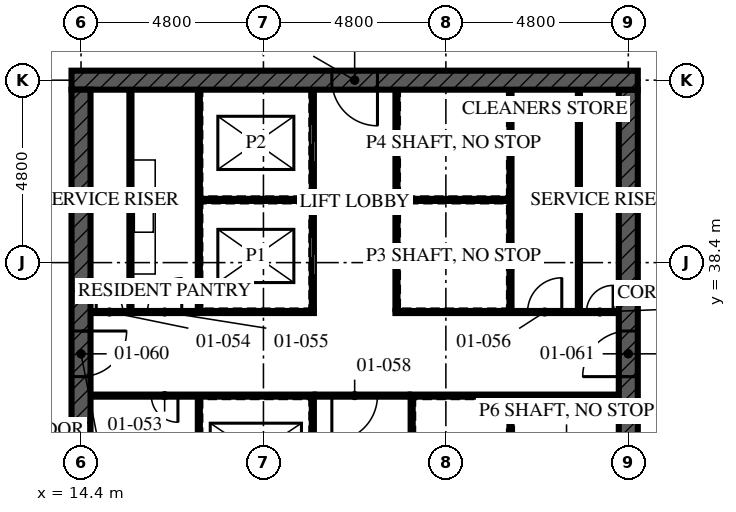
"""IFC4 building model, lengths in metres.
Left out: names, types, materials, properties, quantities, classifications, styles, units other than length and angle.
Written with IfcOpenShell. Run it as: python <this file> out.ifc"""

import sys

from ifc_helpers import new_model, si_unit, direction, frame, frame_2d, origin, place, context, subcontext, project, spatial, rectangle, extrude, element, fill, save


model = new_model("IFC4")
c1 = context("Model", 3, precision=1e-05, world=origin(), true_north=direction((0.0, 1.0)))
c2 = subcontext(c1, "Body", "Model", "MODEL_VIEW")
j1 = project(units=[si_unit("LENGTHUNIT", "METRE"), si_unit("PLANEANGLEUNIT", "RADIAN")], contexts=[c1])
p1 = place(None, origin())
s1 = spatial("IfcSite", under=j1, at=p1, CompositionType="ELEMENT")
p2 = place(p1, origin())
s2 = spatial("IfcBuilding", under=s1, at=p2, CompositionType="ELEMENT")
p3 = place(p2, frame((0.0, 0.0, 4.5)))
s3 = spatial("IfcBuildingStorey", under=s2, at=p3, CompositionType="ELEMENT", Elevation=4.5)
p4 = place(p3, frame((29.05, 43.2, -0.17), z_axis=(0.0, 0.0, 1.0), x_axis=(-1.0, 0.0, 0.0)))
e1 = element("IfcWall", 1, at=p4, inside=s3, PredefinedType="SHEAR", context=c2, shape_type="SweptSolid", body=[
    extrude(rectangle(XDim=14.9, YDim=0.5, at=frame_2d((7.45, 0.0))), origin(), (0.0, 0.0, 1.0), 4.5),
])
p5 = place(p4, frame((6.85, 0.0, 0.17)))
e2 = element("IfcOpeningElement", 2, at=p5, cuts=e1, PredefinedType="OPENING", context=c2, shape_type="SweptSolid", body=[
    extrude(rectangle(XDim=1.2, YDim=2.1, at=frame_2d((0.6, 1.05))), frame((0.0, 0.26, 0.0), z_axis=(0.0, -1.0, 0.0), x_axis=(1.0, 0.0, 0.0)), (0.0, 0.0, 1.0), 0.521),
])
p6 = place(p3, frame((14.4, 42.95, -0.17), z_axis=(0.0, 0.0, 1.0), x_axis=(0.0, -1.0, 0.0)))
e3 = element("IfcWall", 3, at=p6, inside=s3, PredefinedType="SHEAR", context=c2, shape_type="SweptSolid", body=[
    extrude(rectangle(XDim=13.9, YDim=0.5, at=frame_2d((6.95, 0.0))), origin(), (0.0, 0.0, 1.0), 4.5),
])
p7 = place(p6, frame((6.35, 0.0, 0.17)))
e4 = element("IfcOpeningElement", 4, at=p7, cuts=e3, PredefinedType="OPENING", context=c2, shape_type="SweptSolid", body=[
    extrude(rectangle(XDim=1.2, YDim=2.1, at=frame_2d((0.6, 1.05))), frame((0.0, 0.26, 0.0), z_axis=(0.0, -1.0, 0.0), x_axis=(1.0, 0.0, 0.0)), (0.0, 0.0, 1.0), 0.521),
])
p8 = place(p3, frame((28.8, 29.05, -0.17), z_axis=(0.0, 0.0, 1.0), x_axis=(0.0, 1.0, 0.0)))
e5 = element("IfcWall", 5, at=p8, inside=s3, PredefinedType="SHEAR", context=c2, shape_type="SweptSolid", body=[
    extrude(rectangle(XDim=13.9, YDim=0.5, at=frame_2d((6.95, 0.0))), origin(), (0.0, 0.0, 1.0), 4.5),
])
p9 = place(p8, frame((6.35, 0.0, 0.17)))
e6 = element("IfcOpeningElement", 6, at=p9, cuts=e5, PredefinedType="OPENING", context=c2, shape_type="SweptSolid", body=[
    extrude(rectangle(XDim=1.2, YDim=2.1, at=frame_2d((0.6, 1.05))), frame((0.0, 0.26, 0.0), z_axis=(0.0, -1.0, 0.0), x_axis=(1.0, 0.0, 0.0)), (0.0, 0.0, 1.0), 0.521),
])
for number, where, z_axis, x_axis in (
    (7, (15.7, 37.15, 0.0), (0.0, 0.0, 1.0), (0.0, 1.0, 0.0)),
    (8, (27.5, 37.15, 0.0), (0.0, 0.0, 1.0), (0.0, 1.0, 0.0)),
):
    element("IfcWall", number, at=place(p3, frame(where, z_axis=z_axis, x_axis=x_axis)), inside=s3, PredefinedType="SOLIDWALL", context=c2, shape_type="SweptSolid", body=[
        extrude(rectangle(XDim=5.8, YDim=0.1, at=frame_2d((2.9, 0.0))), origin(), (0.0, 0.0, 1.0), 4.33),
    ])
p10 = place(p3, frame((20.5, 29.05, 0.0), z_axis=(0.0, 0.0, 1.0), x_axis=(0.0, 1.0, 0.0)))
e9 = element("IfcWall", 9, at=p10, inside=s3, PredefinedType="SOLIDWALL", context=c2, shape_type="SweptSolid", body=[
    extrude(rectangle(XDim=5.8, YDim=0.1, at=frame_2d((2.9, 0.0))), origin(), (0.0, 0.0, 1.0), 4.33),
])
p11 = place(p10, frame((0.8, 0.0, 0.0)))
e10 = element("IfcOpeningElement", 10, at=p11, cuts=e9, PredefinedType="OPENING", context=c2, shape_type="SweptSolid", body=[
    extrude(rectangle(XDim=1.1, YDim=2.3, at=frame_2d((0.55, 1.15))), frame((0.0, 0.061, 0.0), z_axis=(0.0, -1.0, 0.0), x_axis=(1.0, 0.0, 0.0)), (0.0, 0.0, 1.0), 0.121),
])
p12 = place(p10, frame((3.775, 0.0, 0.0)))
e11 = element("IfcOpeningElement", 11, at=p12, cuts=e9, PredefinedType="OPENING", context=c2, shape_type="SweptSolid", body=[
    extrude(rectangle(XDim=1.1, YDim=2.3, at=frame_2d((0.55, 1.15))), frame((0.0, 0.061, 0.0), z_axis=(0.0, -1.0, 0.0), x_axis=(1.0, 0.0, 0.0)), (0.0, 0.0, 1.0), 0.121),
])
p13 = place(p3, frame((20.5, 37.15, 0.0), z_axis=(0.0, 0.0, 1.0), x_axis=(0.0, 1.0, 0.0)))
e12 = element("IfcWall", 12, at=p13, inside=s3, PredefinedType="SOLIDWALL", context=c2, shape_type="SweptSolid", body=[
    extrude(rectangle(XDim=5.8, YDim=0.1, at=frame_2d((2.9, 0.0))), origin(), (0.0, 0.0, 1.0), 4.33),
])
p14 = place(p13, frame((0.925, 0.0, 0.0)))
e13 = element("IfcOpeningElement", 13, at=p14, cuts=e12, PredefinedType="OPENING", context=c2, shape_type="SweptSolid", body=[
    extrude(rectangle(XDim=1.0, YDim=2.1, at=frame_2d((0.5, 1.05))), frame((0.0, 0.061, 0.0), z_axis=(0.0, -1.0, 0.0), x_axis=(1.0, 0.0, 0.0)), (0.0, 0.0, 1.0), 0.121),
])
p15 = place(p13, frame((3.9, 0.0, 0.0)))
e14 = element("IfcOpeningElement", 14, at=p15, cuts=e12, PredefinedType="OPENING", context=c2, shape_type="SweptSolid", body=[
    extrude(rectangle(XDim=1.0, YDim=2.1, at=frame_2d((0.5, 1.05))), frame((0.0, 0.061, 0.0), z_axis=(0.0, -1.0, 0.0), x_axis=(1.0, 0.0, 0.0)), (0.0, 0.0, 1.0), 0.121),
])
p16 = place(p3, frame((22.7, 37.15, 0.0), z_axis=(0.0, 0.0, 1.0), x_axis=(0.0, 1.0, 0.0)))
e15 = element("IfcWall", 15, at=p16, inside=s3, PredefinedType="SOLIDWALL", context=c2, shape_type="SweptSolid", body=[
    extrude(rectangle(XDim=5.8, YDim=0.1, at=frame_2d((2.9, 0.0))), origin(), (0.0, 0.0, 1.0), 4.33),
])
p17 = place(p3, frame((23.1, 29.05, 0.0), z_axis=(0.0, 0.0, 1.0), x_axis=(0.0, 1.0, 0.0)))
e16 = element("IfcWall", 16, at=p17, inside=s3, PredefinedType="SOLIDWALL", context=c2, shape_type="SweptSolid", body=[
    extrude(rectangle(XDim=5.8, YDim=0.1, at=frame_2d((2.9, 0.0))), origin(), (0.0, 0.0, 1.0), 4.33),
])
p18 = place(p17, frame((1.0, 0.0, 0.0)))
e17 = element("IfcOpeningElement", 17, at=p18, cuts=e16, PredefinedType="OPENING", context=c2, shape_type="SweptSolid", body=[
    extrude(rectangle(XDim=0.7, YDim=2.1, at=frame_2d((0.35, 1.05))), frame((0.0, 0.061, 0.0), z_axis=(0.0, -1.0, 0.0), x_axis=(1.0, 0.0, 0.0)), (0.0, 0.0, 1.0), 0.121),
])
p19 = place(p3, frame((14.65, 34.9, 0.0), z_axis=(0.0, 0.0, 1.0), x_axis=(1.0, 0.0, 0.0)))
e18 = element("IfcWall", 18, at=p19, inside=s3, PredefinedType="SOLIDWALL", context=c2, shape_type="SweptSolid", body=[
    extrude(rectangle(XDim=5.9, YDim=0.1, at=frame_2d((2.95, 0.0))), origin(), (0.0, 0.0, 1.0), 4.33),
])
p20 = place(p19, frame((1.6, 0.0, 0.0)))
e19 = element("IfcOpeningElement", 19, at=p20, cuts=e18, PredefinedType="OPENING", context=c2, shape_type="SweptSolid", body=[
    extrude(rectangle(XDim=0.7, YDim=2.1, at=frame_2d((0.35, 1.05))), frame((0.0, 0.061, 0.0), z_axis=(0.0, -1.0, 0.0), x_axis=(1.0, 0.0, 0.0)), (0.0, 0.0, 1.0), 0.121),
])
p21 = place(p3, frame((23.05, 34.9, 0.0), z_axis=(0.0, 0.0, 1.0), x_axis=(1.0, 0.0, 0.0)))
e20 = element("IfcWall", 20, at=p21, inside=s3, PredefinedType="SOLIDWALL", context=c2, shape_type="SweptSolid", body=[
    extrude(rectangle(XDim=5.5, YDim=0.1, at=frame_2d((2.75, 0.0))), origin(), (0.0, 0.0, 1.0), 4.33),
])
p22 = place(p3, frame((14.65, 37.1, 0.0), z_axis=(0.0, 0.0, 1.0), x_axis=(1.0, 0.0, 0.0)))
e21 = element("IfcWall", 21, at=p22, inside=s3, PredefinedType="SOLIDWALL", context=c2, shape_type="SweptSolid", body=[
    extrude(rectangle(XDim=5.9, YDim=0.1, at=frame_2d((2.95, 0.0))), origin(), (0.0, 0.0, 1.0), 4.33),
])
p23 = place(p22, frame((0.15, 0.0, 0.0)))
e22 = element("IfcOpeningElement", 22, at=p23, cuts=e21, PredefinedType="OPENING", context=c2, shape_type="SweptSolid", body=[
    extrude(rectangle(XDim=0.7, YDim=2.1, at=frame_2d((0.35, 1.05))), frame((0.0, 0.061, 0.0), z_axis=(0.0, -1.0, 0.0), x_axis=(1.0, 0.0, 0.0)), (0.0, 0.0, 1.0), 0.121),
])
p24 = place(p22, frame((1.5, 0.0, 0.0)))
e23 = element("IfcOpeningElement", 23, at=p24, cuts=e21, PredefinedType="OPENING", context=c2, shape_type="SweptSolid", body=[
    extrude(rectangle(XDim=0.9, YDim=2.1, at=frame_2d((0.45, 1.05))), frame((0.0, 0.061, 0.0), z_axis=(0.0, -1.0, 0.0), x_axis=(1.0, 0.0, 0.0)), (0.0, 0.0, 1.0), 0.121),
])
p25 = place(p3, frame((22.65, 37.1, 0.0), z_axis=(0.0, 0.0, 1.0), x_axis=(1.0, 0.0, 0.0)))
e24 = element("IfcWall", 24, at=p25, inside=s3, PredefinedType="SOLIDWALL", context=c2, shape_type="SweptSolid", body=[
    extrude(rectangle(XDim=5.9, YDim=0.1, at=frame_2d((2.95, 0.0))), origin(), (0.0, 0.0, 1.0), 4.33),
])
p26 = place(p25, frame((3.5, 0.0, 0.0)))
e25 = element("IfcOpeningElement", 25, at=p26, cuts=e24, PredefinedType="OPENING", context=c2, shape_type="SweptSolid", body=[
    extrude(rectangle(XDim=0.9, YDim=2.1, at=frame_2d((0.45, 1.05))), frame((0.0, 0.061, 0.0), z_axis=(0.0, -1.0, 0.0), x_axis=(1.0, 0.0, 0.0)), (0.0, 0.0, 1.0), 0.121),
])
p27 = place(p25, frame((5.05, 0.0, 0.0)))
e26 = element("IfcOpeningElement", 26, at=p27, cuts=e24, PredefinedType="OPENING", context=c2, shape_type="SweptSolid", body=[
    extrude(rectangle(XDim=0.7, YDim=2.1, at=frame_2d((0.35, 1.05))), frame((0.0, 0.061, 0.0), z_axis=(0.0, -1.0, 0.0), x_axis=(1.0, 0.0, 0.0)), (0.0, 0.0, 1.0), 0.121),
])
p28 = place(p3, frame((20.55, 34.9, 0.0), z_axis=(0.0, 0.0, 1.0), x_axis=(1.0, 0.0, 0.0)))
e27 = element("IfcWall", 27, at=p28, inside=s3, PredefinedType="SOLIDWALL", context=c2, shape_type="SweptSolid", body=[
    extrude(rectangle(XDim=2.5, YDim=0.1, at=frame_2d((1.25, 0.0))), origin(), (0.0, 0.0, 1.0), 4.33),
])
p29 = place(p28, frame((0.45, 0.0, 0.0)))
e28 = element("IfcOpeningElement", 28, at=p29, cuts=e27, PredefinedType="OPENING", context=c2, shape_type="SweptSolid", body=[
    extrude(rectangle(XDim=1.2, YDim=2.1, at=frame_2d((0.6, 1.05))), frame((0.0, 0.061, 0.0), z_axis=(0.0, -1.0, 0.0), x_axis=(1.0, 0.0, 0.0)), (0.0, 0.0, 1.0), 0.121),
])
for number, where, z_axis, x_axis in (
    (29, (17.5, 29.05, 0.0), (0.0, 0.0, 1.0), (0.0, 1.0, 0.0)),
    (30, (17.5, 37.15, 0.0), (0.0, 0.0, 1.0), (0.0, 1.0, 0.0)),
):
    element("IfcWall", number, at=place(p3, frame(where, z_axis=z_axis, x_axis=x_axis)), inside=s3, PredefinedType="SOLIDWALL", context=c2, shape_type="SweptSolid", body=[
        extrude(rectangle(XDim=5.8, YDim=0.1, at=frame_2d((2.9, 0.0))), origin(), (0.0, 0.0, 1.0), 4.33),
    ])
for number, where, z_axis, x_axis in (
    (31, (17.55, 40.05, 0.0), (0.0, 0.0, 1.0), (1.0, 0.0, 0.0)),
    (32, (22.75, 40.05, 0.0), (0.0, 0.0, 1.0), (1.0, 0.0, 0.0)),
):
    element("IfcWall", number, at=place(p3, frame(where, z_axis=z_axis, x_axis=x_axis)), inside=s3, PredefinedType="SOLIDWALL", context=c2, shape_type="SweptSolid", body=[
        extrude(rectangle(XDim=2.9, YDim=0.1, at=frame_2d((1.45, 0.0))), origin(), (0.0, 0.0, 1.0), 4.33),
    ])
p30 = place(p3, frame((25.7, 37.15, 0.0), z_axis=(0.0, 0.0, 1.0), x_axis=(0.0, 1.0, 0.0)))
e33 = element("IfcWall", 33, at=p30, inside=s3, PredefinedType="SOLIDWALL", context=c2, shape_type="SweptSolid", body=[
    extrude(rectangle(XDim=5.8, YDim=0.1, at=frame_2d((2.9, 0.0))), origin(), (0.0, 0.0, 1.0), 4.33),
])
p31 = place(p3, frame((25.7, 31.95, 0.0), z_axis=(0.0, 0.0, 1.0), x_axis=(0.0, 1.0, 0.0)))
e34 = element("IfcWall", 34, at=p31, inside=s3, PredefinedType="SOLIDWALL", context=c2, shape_type="SweptSolid", body=[
    extrude(rectangle(XDim=2.9, YDim=0.1, at=frame_2d((1.45, 0.0))), origin(), (0.0, 0.0, 1.0), 4.33),
])
p32 = place(p14, origin())
e35 = element("IfcDoor", 35, at=p32, inside=s3, OperationType="SLIDING_TO_LEFT", PredefinedType="DOOR", context=c2, shape_type="SweptSolid", body=[
    extrude(rectangle(XDim=1.0, YDim=2.1, at=frame_2d((0.5, 1.05))), frame((0.0, 0.05, 0.0), z_axis=(0.0, -1.0, 0.0), x_axis=(1.0, 0.0, 0.0)), (0.0, 0.0, 1.0), 0.1),
])
fill(e13, e35)
p33 = place(p15, origin())
e36 = element("IfcDoor", 36, at=p33, inside=s3, OperationType="SLIDING_TO_LEFT", PredefinedType="DOOR", context=c2, shape_type="SweptSolid", body=[
    extrude(rectangle(XDim=1.0, YDim=2.1, at=frame_2d((0.5, 1.05))), frame((0.0, 0.05, 0.0), z_axis=(0.0, -1.0, 0.0), x_axis=(1.0, 0.0, 0.0)), (0.0, 0.0, 1.0), 0.1),
])
fill(e14, e36)
p34 = place(p20, frame((0.7, 0.0, 0.0), z_axis=(0.0, 0.0, 1.0), x_axis=(-1.0, 0.0, 0.0)))
e37 = element("IfcDoor", 37, at=p34, inside=s3, OperationType="SINGLE_SWING_RIGHT", PredefinedType="DOOR", context=c2, shape_type="SweptSolid", body=[
    extrude(rectangle(XDim=0.7, YDim=2.1, at=frame_2d((0.35, 1.05))), frame((0.0, 0.027, 0.0), z_axis=(0.0, -1.0, 0.0), x_axis=(1.0, 0.0, 0.0)), (0.0, 0.0, 1.0), 0.054),
])
fill(e19, e37)
p35 = place(p23, origin())
e38 = element("IfcDoor", 38, at=p35, inside=s3, OperationType="SINGLE_SWING_RIGHT", PredefinedType="DOOR", context=c2, shape_type="SweptSolid", body=[
    extrude(rectangle(XDim=0.7, YDim=2.1, at=frame_2d((0.35, 1.05))), frame((0.0, 0.027, 0.0), z_axis=(0.0, -1.0, 0.0), x_axis=(1.0, 0.0, 0.0)), (0.0, 0.0, 1.0), 0.054),
])
fill(e22, e38)
p36 = place(p24, origin())
e39 = element("IfcDoor", 39, at=p36, inside=s3, OperationType="SINGLE_SWING_LEFT", PredefinedType="DOOR", context=c2, shape_type="SweptSolid", body=[
    extrude(rectangle(XDim=0.9, YDim=2.1, at=frame_2d((0.45, 1.05))), frame((0.0, 0.027, 0.0), z_axis=(0.0, -1.0, 0.0), x_axis=(1.0, 0.0, 0.0)), (0.0, 0.0, 1.0), 0.054),
])
fill(e23, e39)
p37 = place(p26, origin())
e40 = element("IfcDoor", 40, at=p37, inside=s3, OperationType="SINGLE_SWING_LEFT", PredefinedType="DOOR", context=c2, shape_type="SweptSolid", body=[
    extrude(rectangle(XDim=0.9, YDim=2.1, at=frame_2d((0.45, 1.05))), frame((0.0, 0.027, 0.0), z_axis=(0.0, -1.0, 0.0), x_axis=(1.0, 0.0, 0.0)), (0.0, 0.0, 1.0), 0.054),
])
fill(e25, e40)
p38 = place(p27, origin())
e41 = element("IfcDoor", 41, at=p38, inside=s3, OperationType="SINGLE_SWING_LEFT", PredefinedType="DOOR", context=c2, shape_type="SweptSolid", body=[
    extrude(rectangle(XDim=0.7, YDim=2.1, at=frame_2d((0.35, 1.05))), frame((0.0, 0.027, 0.0), z_axis=(0.0, -1.0, 0.0), x_axis=(1.0, 0.0, 0.0)), (0.0, 0.0, 1.0), 0.054),
])
fill(e26, e41)
p39 = place(p29, frame((1.2, 0.0, 0.0), z_axis=(0.0, 0.0, 1.0), x_axis=(-1.0, 0.0, 0.0)))
e42 = element("IfcDoor", 42, at=p39, inside=s3, OperationType="SINGLE_SWING_LEFT", PredefinedType="DOOR", context=c2, shape_type="SweptSolid", body=[
    extrude(rectangle(XDim=1.2, YDim=2.1, at=frame_2d((0.6, 1.05))), frame((0.0, 0.027, 0.0), z_axis=(0.0, -1.0, 0.0), x_axis=(1.0, 0.0, 0.0)), (0.0, 0.0, 1.0), 0.054),
])
fill(e28, e42)
p40 = place(p7, origin())
e43 = element("IfcDoor", 43, at=p40, inside=s3, OperationType="SINGLE_SWING_LEFT", PredefinedType="DOOR", context=c2, shape_type="SweptSolid", body=[
    extrude(rectangle(XDim=1.2, YDim=2.1, at=frame_2d((0.6, 1.05))), frame((0.0, 0.027, 0.0), z_axis=(0.0, -1.0, 0.0), x_axis=(1.0, 0.0, 0.0)), (0.0, 0.0, 1.0), 0.054),
])
fill(e4, e43)
p41 = place(p9, origin())
e44 = element("IfcDoor", 44, at=p41, inside=s3, OperationType="SINGLE_SWING_LEFT", PredefinedType="DOOR", context=c2, shape_type="SweptSolid", body=[
    extrude(rectangle(XDim=1.2, YDim=2.1, at=frame_2d((0.6, 1.05))), frame((0.0, 0.027, 0.0), z_axis=(0.0, -1.0, 0.0), x_axis=(1.0, 0.0, 0.0)), (0.0, 0.0, 1.0), 0.054),
])
fill(e6, e44)
p42 = place(p5, origin())
e45 = element("IfcDoor", 45, at=p42, inside=s3, OperationType="SINGLE_SWING_LEFT", PredefinedType="DOOR", context=c2, shape_type="SweptSolid", body=[
    extrude(rectangle(XDim=1.2, YDim=2.1, at=frame_2d((0.6, 1.05))), frame((0.0, 0.027, 0.0), z_axis=(0.0, -1.0, 0.0), x_axis=(1.0, 0.0, 0.0)), (0.0, 0.0, 1.0), 0.054),
])
fill(e2, e45)
save(model, sys.argv[1])
